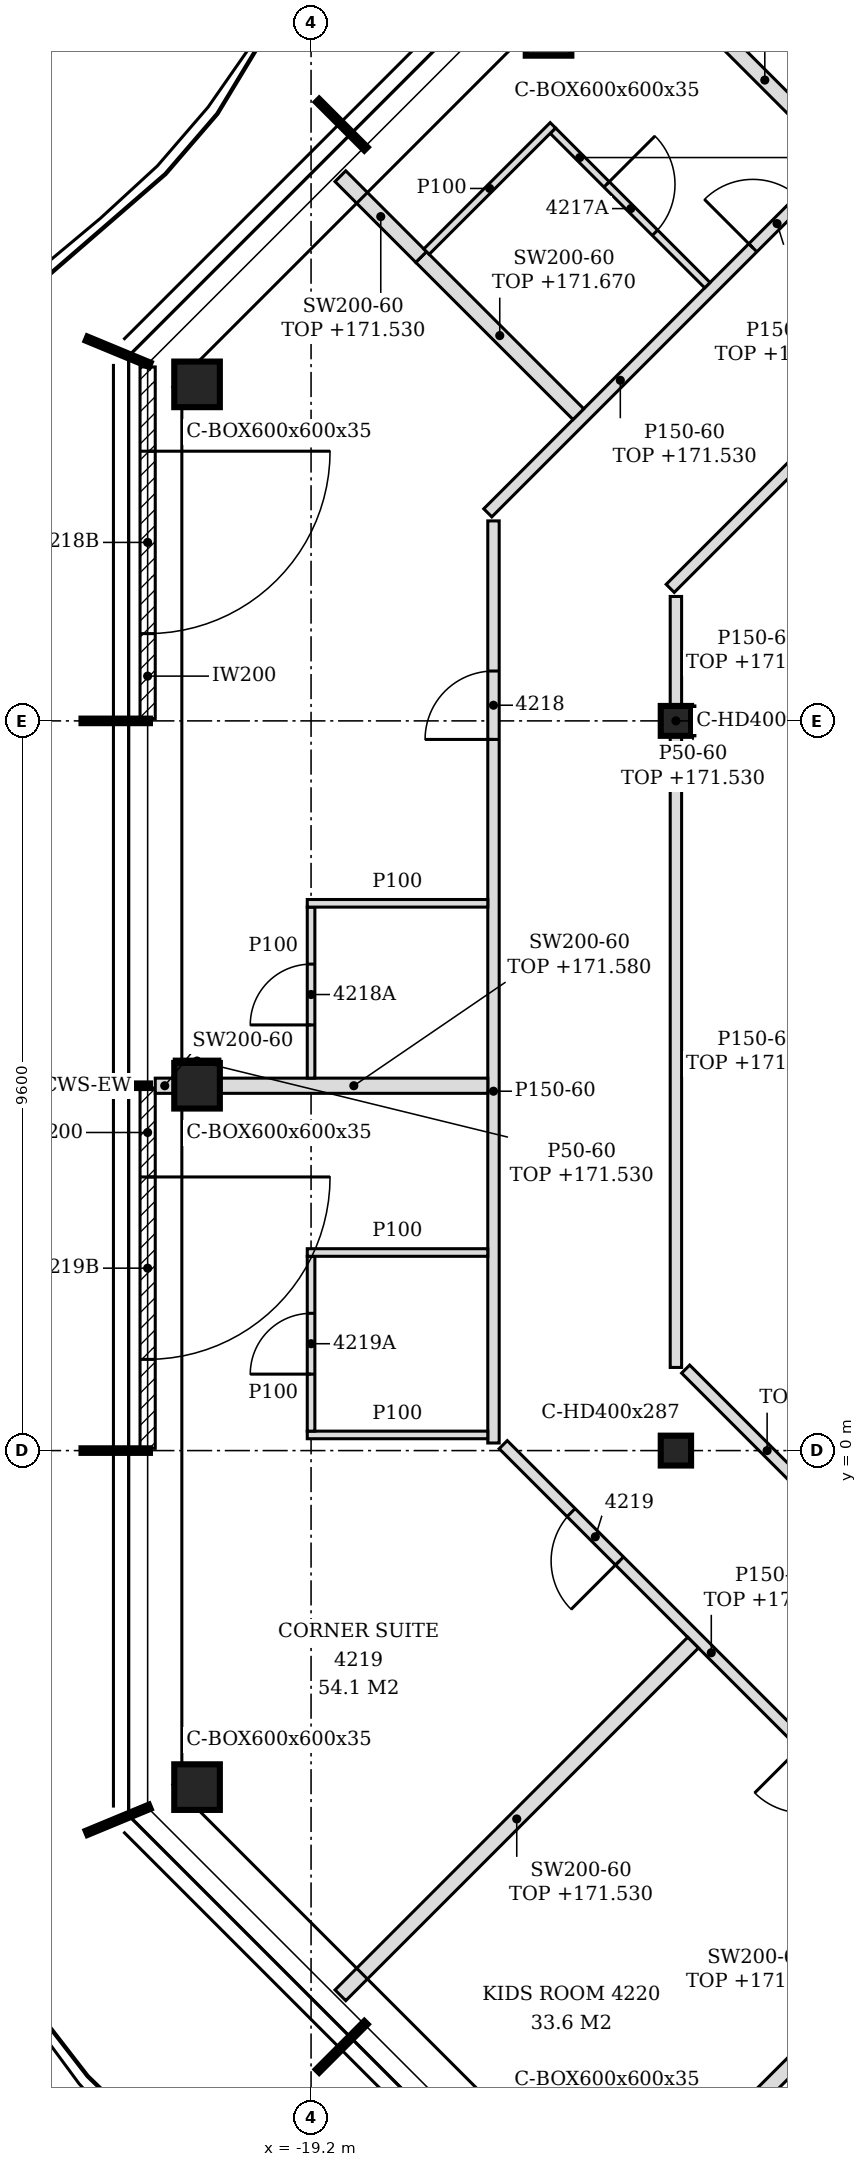
"""IFC4 building model, lengths in metres.
Left out: names, types, materials, properties, quantities, classifications, styles, units other than length and angle.
Written with IfcOpenShell. Run it as: python <this file> out.ifc"""

import sys

from ifc_helpers import new_model, si_unit, direction, frame, frame_2d, origin, origin_2d, place, context, subcontext, project, spatial, polyline, rectangle, hollow_rectangle, i_section, outline, extrude, clip, halfspace, element, fill, save


model = new_model("IFC4")
c1 = context("Model", 3, precision=1e-05, world=origin(), true_north=direction((0.0, 1.0)))
c2 = subcontext(c1, "Body", "Model", "MODEL_VIEW")
j1 = project(units=[si_unit("LENGTHUNIT", "METRE"), si_unit("PLANEANGLEUNIT", "RADIAN")], contexts=[c1])
p1 = place(None, origin())
s1 = spatial("IfcSite", under=j1, at=p1, CompositionType="ELEMENT")
p2 = place(p1, origin())
s2 = spatial("IfcBuilding", under=s1, at=p2, CompositionType="ELEMENT")
p3 = place(p2, frame((0.0, 0.0, 168.6)))
s3 = spatial("IfcBuildingStorey", under=s2, at=p3, CompositionType="ELEMENT", Elevation=168.6)
for number, where, z_axis, x_axis in (
    (1, (-16.076, 18.652, -0.15), (0.0, 0.0, 1.0), (1.0, 0.0, 0.0)),
    (2, (-20.7, 14.027, -0.15), (0.0, 0.0, 1.0), (1.0, 0.0, 0.0)),
    (3, (-20.7, 4.8, -0.15), (0.0, 0.0, 1.0), (1.0, 0.0, 0.0)),
    (4, (-20.7, -4.427, -0.15), (0.0, 0.0, 1.0), (1.0, 0.0, 0.0)),
):
    element("IfcColumn", number, at=place(p3, frame(where, z_axis=z_axis, x_axis=x_axis)), inside=s3, PredefinedType="COLUMN", context=c2, shape_type="Clipping", body=[
        clip(extrude(hollow_rectangle(XDim=0.6, YDim=0.6, WallThickness=0.035, at=origin_2d()), origin(), (0.0, 0.0, 1.0), 3.6), halfspace(frame((0.0, 0.0, 3.589), z_axis=(0.0, 0.0, 1.0), x_axis=(1.0, 0.0, 0.0)), False)),
    ])
for number, where, z_axis, x_axis in (
    (5, (-14.4, 0.0, -0.15), (0.0, 0.0, 1.0), (1.0, 0.0, 0.0)),
    (6, (-14.4, 9.6, -0.15), (0.0, 0.0, 1.0), (1.0, 0.0, 0.0)),
):
    element("IfcColumn", number, at=place(p3, frame(where, z_axis=z_axis, x_axis=x_axis)), inside=s3, PredefinedType="COLUMN", context=c2, shape_type="SweptSolid", body=[
        extrude(i_section(OverallWidth=0.399, OverallDepth=0.393, WebThickness=0.023, FlangeThickness=0.037, FilletRadius=0.015, at=origin_2d()), origin(), (0.0, 0.0, 1.0), 3.6),
    ])
p4 = place(p3, frame((-21.35, 14.256, 0.0), z_axis=(0.0, 0.0, 1.0), x_axis=(0.0, -1.0, 0.0)))
e7 = element("IfcWall", 7, at=p4, inside=s3, PredefinedType="NOTDEFINED", context=c2, shape_type="SweptSolid", body=[
    extrude(rectangle(XDim=4.626, YDim=0.2, at=frame_2d((2.313, 0.0))), origin(), (0.0, 0.0, 1.0), 3.45),
])
p5 = place(p4, frame((1.108, 0.0, 0.0)))
e8 = element("IfcOpeningElement", 8, at=p5, cuts=e7, PredefinedType="OPENING", context=c2, shape_type="SweptSolid", body=[
    extrude(rectangle(XDim=2.4, YDim=2.4, at=frame_2d((1.2, 1.2))), frame((0.0, 0.11, 0.0), z_axis=(0.0, -1.0, 0.0), x_axis=(1.0, 0.0, 0.0)), (0.0, 0.0, 1.0), 0.22),
])
p6 = place(p3, frame((-21.35, 4.77, 0.0), z_axis=(0.0, 0.0, 1.0), x_axis=(0.0, -1.0, 0.0)))
e9 = element("IfcWall", 9, at=p6, inside=s3, PredefinedType="NOTDEFINED", context=c2, shape_type="SweptSolid", body=[
    extrude(rectangle(XDim=4.74, YDim=0.2, at=frame_2d((2.37, 0.0))), origin(), (0.0, 0.0, 1.0), 3.45),
])
p7 = place(p6, frame((1.17, 0.0, 0.0)))
e10 = element("IfcOpeningElement", 10, at=p7, cuts=e9, PredefinedType="OPENING", context=c2, shape_type="SweptSolid", body=[
    extrude(rectangle(XDim=2.4, YDim=2.4, at=frame_2d((1.2, 1.2))), frame((0.0, 0.11, 0.0), z_axis=(0.0, -1.0, 0.0), x_axis=(1.0, 0.0, 0.0)), (0.0, 0.0, 1.0), 0.22),
])
p8 = place(p3, frame((-14.202, -9.402, 0.0), z_axis=(0.0, 0.0, 1.0), x_axis=(0.707081776084, 0.707131785404, 0.0)))
e11 = element("IfcWall", 11, at=p8, inside=s3, PredefinedType="PARTITIONING", context=c2, shape_type="SweptSolid", body=[
    extrude(rectangle(XDim=4.882, YDim=0.2, at=frame_2d((2.441, 0.0))), origin(), (0.0, 0.0, 1.0), 2.93),
])
p9 = place(p3, frame((-8.322, -8.272, 0.0), z_axis=(0.0, 0.0, 1.0), x_axis=(-0.707117118476, 0.707096443746, 0.0)))
e12 = element("IfcWall", 12, at=p9, inside=s3, PredefinedType="PARTITIONING", context=c2, shape_type="SweptSolid", body=[
    extrude(rectangle(XDim=11.809, YDim=0.15, at=frame_2d((5.904, 0.0))), origin(), (0.0, 0.0, 1.0), 2.93),
])
p10 = place(p9, frame((9.645, 0.0, 0.0)))
e13 = element("IfcOpeningElement", 13, at=p10, cuts=e12, PredefinedType="OPENING", context=c2, shape_type="SweptSolid", body=[
    extrude(rectangle(XDim=0.9, YDim=2.1, at=frame_2d((0.45, 1.05))), frame((0.0, 0.085, 0.0), z_axis=(0.0, -1.0, 0.0), x_axis=(1.0, 0.0, 0.0)), (0.0, 0.0, 1.0), 0.17),
])
p11 = place(p9, frame((5.33, 0.0, 0.0)))
e14 = element("IfcOpeningElement", 14, at=p11, cuts=e12, PredefinedType="OPENING", context=c2, shape_type="SweptSolid", body=[
    extrude(rectangle(XDim=0.9, YDim=2.1, at=frame_2d((0.45, 1.05))), frame((0.0, 0.085, 0.0), z_axis=(0.0, -1.0, 0.0), x_axis=(1.0, 0.0, 0.0)), (0.0, 0.0, 1.0), 0.17),
])
p12 = place(p9, frame((1.139, 0.0, 0.0)))
e15 = element("IfcOpeningElement", 15, at=p12, cuts=e12, PredefinedType="OPENING", context=c2, shape_type="SweptSolid", body=[
    extrude(rectangle(XDim=0.9, YDim=2.1, at=frame_2d((0.45, 1.05))), frame((0.0, 0.085, 0.0), z_axis=(0.0, -1.0, 0.0), x_axis=(1.0, 0.0, 0.0)), (0.0, 0.0, 1.0), 0.17),
])
p13 = place(p3, frame((-18.814, -7.166, 0.0), z_axis=(0.0, 0.0, 1.0), x_axis=(0.707088178254, 0.70712538363, 0.0)))
e16 = element("IfcWall", 16, at=p13, inside=s3, PredefinedType="PARTITIONING", context=c2, shape_type="SweptSolid", body=[
    extrude(rectangle(XDim=6.562, YDim=0.2, at=frame_2d((3.281, 0.0))), origin(), (0.0, 0.0, 1.0), 2.93),
])
p14 = place(p3, frame((-12.128, -1.072, 0.0), z_axis=(0.0, 0.0, 1.0), x_axis=(-0.707106781187, 0.707106781187, 0.0)))
e17 = element("IfcWall", 17, at=p14, inside=s3, PredefinedType="PARTITIONING", context=c2, shape_type="SweptSolid", body=[
    extrude(rectangle(XDim=3.032, YDim=0.15, at=frame_2d((1.516, 0.0))), origin(), (0.0, 0.0, 1.0), 2.93),
])
p15 = place(p3, frame((-16.8, 0.1, 0.0), z_axis=(0.0, 0.0, 1.0), x_axis=(0.0, 1.0, 0.0)))
e18 = element("IfcWall", 18, at=p15, inside=s3, PredefinedType="PARTITIONING", context=c2, shape_type="SweptSolid", body=[
    extrude(outline(polyline([(0.0, 0.0), (12.131, 0.0), (12.131, 3.45), (9.595, 3.45), (9.593, 2.98), (9.405, 2.98), (9.403, 3.45), (4.795, 3.45), (4.793, 2.98), (4.605, 2.98), (4.603, 3.45), (0.0, 3.45), (0.0, 0.0)])), frame((0.0, 0.075, 0.0), z_axis=(0.0, -1.0, 0.0), x_axis=(1.0, 0.0, 0.0)), (0.0, 0.0, 1.0), 0.15),
])
p16 = place(p15, frame((9.256, 0.0, 0.0)))
e19 = element("IfcOpeningElement", 19, at=p16, cuts=e18, PredefinedType="OPENING", context=c2, shape_type="SweptSolid", body=[
    extrude(rectangle(XDim=0.9, YDim=2.1, at=frame_2d((0.45, 1.05))), frame((0.0, 0.085, 0.0), z_axis=(0.0, -1.0, 0.0), x_axis=(1.0, 0.0, 0.0)), (0.0, 0.0, 1.0), 0.17),
])
p17 = place(p3, frame((-19.25, 0.206, 0.0), z_axis=(0.0, 0.0, 1.0), x_axis=(1.0, 0.0, 0.0)))
e20 = element("IfcWall", 20, at=p17, inside=s3, PredefinedType="PARTITIONING", context=c2, shape_type="SweptSolid", body=[
    extrude(rectangle(XDim=2.375, YDim=0.1, at=frame_2d((1.188, 0.0))), origin(), (0.0, 0.0, 1.0), 3.45),
])
p18 = place(p3, frame((-19.2, 0.256, 0.0), z_axis=(0.0, 0.0, 1.0), x_axis=(0.0, 1.0, 0.0)))
e21 = element("IfcWall", 21, at=p18, inside=s3, PredefinedType="PARTITIONING", context=c2, shape_type="SweptSolid", body=[
    extrude(rectangle(XDim=2.3, YDim=0.1, at=frame_2d((1.15, 0.0))), origin(), (0.0, 0.0, 1.0), 3.45),
])
p19 = place(p18, frame((0.75, 0.0, 0.0)))
e22 = element("IfcOpeningElement", 22, at=p19, cuts=e21, PredefinedType="OPENING", context=c2, shape_type="SweptSolid", body=[
    extrude(rectangle(XDim=0.8, YDim=2.1, at=frame_2d((0.4, 1.05))), frame((0.0, 0.06, 0.0), z_axis=(0.0, -1.0, 0.0), x_axis=(1.0, 0.0, 0.0)), (0.0, 0.0, 1.0), 0.12),
])
p20 = place(p3, frame((-14.4, 1.094, 0.0), z_axis=(0.0, 0.0, 1.0), x_axis=(0.0, 1.0, 0.0)))
e23 = element("IfcWall", 23, at=p20, inside=s3, PredefinedType="PARTITIONING", context=c2, shape_type="SweptSolid", body=[
    extrude(rectangle(XDim=8.31, YDim=0.15, at=frame_2d((4.155, 0.0))), origin(), (0.0, 0.0, 1.0), 2.93),
])
p21 = place(p3, frame((-19.25, 2.606, 0.0), z_axis=(0.0, 0.0, 1.0), x_axis=(1.0, 0.0, 0.0)))
e24 = element("IfcWall", 24, at=p21, inside=s3, PredefinedType="PARTITIONING", context=c2, shape_type="SweptSolid", body=[
    extrude(rectangle(XDim=2.375, YDim=0.1, at=frame_2d((1.188, 0.0))), origin(), (0.0, 0.0, 1.0), 3.45),
])
p22 = place(p3, frame((-21.25, 4.8, 0.0), z_axis=(0.0, 0.0, 1.0), x_axis=(1.0, 0.0, 0.0)))
e25 = element("IfcWall", 25, at=p22, inside=s3, PredefinedType="PARTITIONING", context=c2, shape_type="SweptSolid", body=[
    extrude(rectangle(XDim=0.25, YDim=0.2, at=frame_2d((0.125, 0.0))), origin(), (0.0, 0.0, 1.0), 3.45),
])
p23 = place(p3, frame((-20.4, 4.8, 0.0), z_axis=(0.0, 0.0, 1.0), x_axis=(1.0, 0.0, 0.0)))
e26 = element("IfcWall", 26, at=p23, inside=s3, PredefinedType="PARTITIONING", context=c2, shape_type="SweptSolid", body=[
    extrude(rectangle(XDim=3.525, YDim=0.2, at=frame_2d((1.762, 0.0))), origin(), (0.0, 0.0, 1.0), 2.98),
])
p24 = place(p3, frame((-19.2, 4.9, 0.0), z_axis=(0.0, 0.0, 1.0), x_axis=(0.0, 1.0, 0.0)))
e27 = element("IfcWall", 27, at=p24, inside=s3, PredefinedType="PARTITIONING", context=c2, shape_type="SweptSolid", body=[
    extrude(rectangle(XDim=2.25, YDim=0.1, at=frame_2d((1.125, 0.0))), origin(), (0.0, 0.0, 1.0), 3.45),
])
p25 = place(p24, frame((0.7, 0.0, 0.0)))
e28 = element("IfcOpeningElement", 28, at=p25, cuts=e27, PredefinedType="OPENING", context=c2, shape_type="SweptSolid", body=[
    extrude(rectangle(XDim=0.8, YDim=2.1, at=frame_2d((0.4, 1.05))), frame((0.0, 0.06, 0.0), z_axis=(0.0, -1.0, 0.0), x_axis=(1.0, 0.0, 0.0)), (0.0, 0.0, 1.0), 0.12),
])
p26 = place(p3, frame((-19.25, 7.2, 0.0), z_axis=(0.0, 0.0, 1.0), x_axis=(1.0, 0.0, 0.0)))
e29 = element("IfcWall", 29, at=p26, inside=s3, PredefinedType="PARTITIONING", context=c2, shape_type="SweptSolid", body=[
    extrude(rectangle(XDim=2.375, YDim=0.1, at=frame_2d((1.188, 0.0))), origin(), (0.0, 0.0, 1.0), 3.45),
])
p27 = place(p3, frame((-14.4, 9.796, 0.0), z_axis=(0.0, 0.0, 1.0), x_axis=(0.0, 1.0, 0.0)))
e30 = element("IfcWall", 30, at=p27, inside=s3, PredefinedType="PARTITIONING", context=c2, shape_type="SweptSolid", body=[
    extrude(rectangle(XDim=1.44, YDim=0.15, at=frame_2d((0.72, 0.0))), origin(), (0.0, 0.0, 1.0), 2.93),
])
p28 = place(p3, frame((-14.475, 11.343, 0.0), z_axis=(0.0, 0.0, 1.0), x_axis=(0.707124921665, 0.707088640243, 0.0)))
e31 = element("IfcWall", 31, at=p28, inside=s3, PredefinedType="PARTITIONING", context=c2, shape_type="SweptSolid", body=[
    extrude(rectangle(XDim=6.729, YDim=0.15, at=frame_2d((3.365, 0.0))), origin(), (0.0, 0.0, 1.0), 2.93),
])
p29 = place(p3, frame((-16.875, 12.337, 0.0), z_axis=(0.0, 0.0, 1.0), x_axis=(0.707106781187, 0.707106781187, 0.0)))
e32 = element("IfcWall", 32, at=p29, inside=s3, PredefinedType="PARTITIONING", context=c2, shape_type="SweptSolid", body=[
    extrude(rectangle(XDim=9.148, YDim=0.15, at=frame_2d((4.574, 0.0))), origin(), (0.0, 0.0, 1.0), 2.93),
])
p30 = place(p29, frame((7.426, 0.0, 0.0)))
e33 = element("IfcOpeningElement", 33, at=p30, cuts=e32, PredefinedType="OPENING", context=c2, shape_type="SweptSolid", body=[
    extrude(rectangle(XDim=0.9, YDim=2.1, at=frame_2d((0.45, 1.05))), frame((0.0, 0.085, 0.0), z_axis=(0.0, -1.0, 0.0), x_axis=(1.0, 0.0, 0.0)), (0.0, 0.0, 1.0), 0.17),
])
p31 = place(p29, frame((4.932, 0.0, 0.0)))
e34 = element("IfcOpeningElement", 34, at=p31, cuts=e32, PredefinedType="OPENING", context=c2, shape_type="SweptSolid", body=[
    extrude(rectangle(XDim=0.9, YDim=2.1, at=frame_2d((0.45, 1.05))), frame((0.0, 0.085, 0.0), z_axis=(0.0, -1.0, 0.0), x_axis=(1.0, 0.0, 0.0)), (0.0, 0.0, 1.0), 0.17),
])
p32 = place(p3, frame((-15.683, 13.635, 0.0), z_axis=(0.0, 0.0, 1.0), x_axis=(-0.707273689425, 0.706939833541, 0.0)))
e35 = element("IfcWall", 35, at=p32, inside=s3, PredefinedType="PARTITIONING", context=c2, shape_type="SweptSolid", body=[
    extrude(rectangle(XDim=2.925, YDim=0.2, at=frame_2d((1.462, 0.0))), origin(), (0.0, 0.0, 1.0), 3.07),
])
p33 = place(p3, frame((-13.986, 15.332, 0.0), z_axis=(0.0, 0.0, 1.0), x_axis=(-0.707106781187, 0.707106781187, 0.0)))
e36 = element("IfcWall", 36, at=p33, inside=s3, PredefinedType="PARTITIONING", context=c2, shape_type="SweptSolid", body=[
    extrude(rectangle(XDim=2.874, YDim=0.1, at=frame_2d((1.437, 0.0))), origin(), (0.0, 0.0, 1.0), 2.93),
])
p34 = place(p33, frame((0.975, 0.0, 0.0)))
e37 = element("IfcOpeningElement", 37, at=p34, cuts=e36, PredefinedType="OPENING", context=c2, shape_type="SweptSolid", body=[
    extrude(rectangle(XDim=0.9, YDim=2.1, at=frame_2d((0.45, 1.05))), frame((0.0, 0.06, 0.0), z_axis=(0.0, -1.0, 0.0), x_axis=(1.0, 0.0, 0.0)), (0.0, 0.0, 1.0), 0.12),
])
p35 = place(p3, frame((-17.752, 15.703, 0.0), z_axis=(0.0, 0.0, 1.0), x_axis=(-0.706863049337, 0.707350429054, 0.0)))
e38 = element("IfcWall", 38, at=p35, inside=s3, PredefinedType="PARTITIONING", context=c2, shape_type="SweptSolid", body=[
    extrude(rectangle(XDim=1.503, YDim=0.2, at=frame_2d((0.751, 0.0))), origin(), (0.0, 0.0, 1.0), 2.93),
])
p36 = place(p3, frame((-17.681, 15.774, 0.0), z_axis=(0.0, 0.0, 1.0), x_axis=(0.707314478862, 0.706899022487, 0.0)))
e39 = element("IfcWall", 39, at=p36, inside=s3, PredefinedType="PARTITIONING", context=c2, shape_type="SweptSolid", body=[
    extrude(rectangle(XDim=2.351, YDim=0.1, at=frame_2d((1.175, 0.0))), origin(), (0.0, 0.0, 1.0), 3.45),
])
p37 = place(p3, frame((-12.259, 17.059, 0.0), z_axis=(0.0, 0.0, 1.0), x_axis=(-0.707106781187, 0.707106781187, 0.0)))
e40 = element("IfcWall", 40, at=p37, inside=s3, PredefinedType="PARTITIONING", context=c2, shape_type="SweptSolid", body=[
    extrude(rectangle(XDim=2.748, YDim=0.2, at=frame_2d((1.374, 0.0))), origin(), (0.0, 0.0, 1.0), 2.93),
])
p38 = place(p3, frame((-14.176, 9.404, 0.0), z_axis=(0.0, 0.0, 1.0), x_axis=(0.0, 1.0, 0.0)))
e41 = element("IfcWall", 41, at=p38, inside=s3, PredefinedType="PARTITIONING", context=c2, shape_type="SweptSolid", body=[
    extrude(rectangle(XDim=0.393, YDim=0.05, at=frame_2d((0.196, 0.0))), origin(), (0.0, 0.0, 1.0), 2.93),
])
p39 = place(p3, frame((-21.0, 5.125, 0.0), z_axis=(0.0, 0.0, 1.0), x_axis=(1.0, 0.0, 0.0)))
e42 = element("IfcWall", 42, at=p39, inside=s3, PredefinedType="PARTITIONING", context=c2, shape_type="SweptSolid", body=[
    extrude(rectangle(XDim=0.6, YDim=0.05, at=frame_2d((0.3, 0.0))), origin(), (0.0, 0.0, 1.0), 2.93),
])
p40 = place(p5, origin())
e43 = element("IfcDoor", 43, at=p40, inside=s3, OperationType="SINGLE_SWING_LEFT", PredefinedType="DOOR", context=c2, shape_type="SweptSolid", body=[
    extrude(rectangle(XDim=2.4, YDim=2.4, at=frame_2d((1.2, 1.2))), frame((0.0, 0.025, 0.0), z_axis=(0.0, -1.0, 0.0), x_axis=(1.0, 0.0, 0.0)), (0.0, 0.0, 1.0), 0.05),
])
fill(e8, e43)
p41 = place(p7, origin())
e44 = element("IfcDoor", 44, at=p41, inside=s3, OperationType="SINGLE_SWING_LEFT", PredefinedType="DOOR", context=c2, shape_type="SweptSolid", body=[
    extrude(rectangle(XDim=2.4, YDim=2.4, at=frame_2d((1.2, 1.2))), frame((0.0, 0.025, 0.0), z_axis=(0.0, -1.0, 0.0), x_axis=(1.0, 0.0, 0.0)), (0.0, 0.0, 1.0), 0.05),
])
fill(e10, e44)
p42 = place(p31, origin())
e45 = element("IfcDoor", 45, at=p42, inside=s3, OperationType="SINGLE_SWING_LEFT", PredefinedType="DOOR", context=c2, shape_type="SweptSolid", body=[
    extrude(rectangle(XDim=0.9, YDim=2.1, at=frame_2d((0.45, 1.05))), frame((0.0, 0.025, 0.0), z_axis=(0.0, -1.0, 0.0), x_axis=(1.0, 0.0, 0.0)), (0.0, 0.0, 1.0), 0.05),
])
fill(e34, e45)
p43 = place(p34, frame((0.9, 0.0, 0.0), z_axis=(0.0, 0.0, 1.0), x_axis=(-1.0, 0.0, 0.0)))
e46 = element("IfcDoor", 46, at=p43, inside=s3, OperationType="SINGLE_SWING_LEFT", PredefinedType="DOOR", context=c2, shape_type="SweptSolid", body=[
    extrude(rectangle(XDim=0.9, YDim=2.1, at=frame_2d((0.45, 1.05))), frame((0.0, 0.025, 0.0), z_axis=(0.0, -1.0, 0.0), x_axis=(1.0, 0.0, 0.0)), (0.0, 0.0, 1.0), 0.05),
])
fill(e37, e46)
p44 = place(p16, origin())
e47 = element("IfcDoor", 47, at=p44, inside=s3, OperationType="SINGLE_SWING_LEFT", PredefinedType="DOOR", context=c2, shape_type="SweptSolid", body=[
    extrude(rectangle(XDim=0.9, YDim=2.1, at=frame_2d((0.45, 1.05))), frame((0.0, 0.025, 0.0), z_axis=(0.0, -1.0, 0.0), x_axis=(1.0, 0.0, 0.0)), (0.0, 0.0, 1.0), 0.05),
])
fill(e19, e47)
p45 = place(p25, origin())
e48 = element("IfcDoor", 48, at=p45, inside=s3, OperationType="SINGLE_SWING_LEFT", PredefinedType="DOOR", context=c2, shape_type="SweptSolid", body=[
    extrude(rectangle(XDim=0.8, YDim=2.1, at=frame_2d((0.4, 1.05))), frame((0.0, 0.025, 0.0), z_axis=(0.0, -1.0, 0.0), x_axis=(1.0, 0.0, 0.0)), (0.0, 0.0, 1.0), 0.05),
])
fill(e28, e48)
p46 = place(p10, origin())
e49 = element("IfcDoor", 49, at=p46, inside=s3, OperationType="SINGLE_SWING_LEFT", PredefinedType="DOOR", context=c2, shape_type="SweptSolid", body=[
    extrude(rectangle(XDim=0.9, YDim=2.1, at=frame_2d((0.45, 1.05))), frame((0.0, 0.025, 0.0), z_axis=(0.0, -1.0, 0.0), x_axis=(1.0, 0.0, 0.0)), (0.0, 0.0, 1.0), 0.05),
])
fill(e13, e49)
p47 = place(p19, origin())
e50 = element("IfcDoor", 50, at=p47, inside=s3, OperationType="SINGLE_SWING_LEFT", PredefinedType="DOOR", context=c2, shape_type="SweptSolid", body=[
    extrude(rectangle(XDim=0.8, YDim=2.1, at=frame_2d((0.4, 1.05))), frame((0.0, 0.025, 0.0), z_axis=(0.0, -1.0, 0.0), x_axis=(1.0, 0.0, 0.0)), (0.0, 0.0, 1.0), 0.05),
])
fill(e22, e50)
save(model, sys.argv[1])
